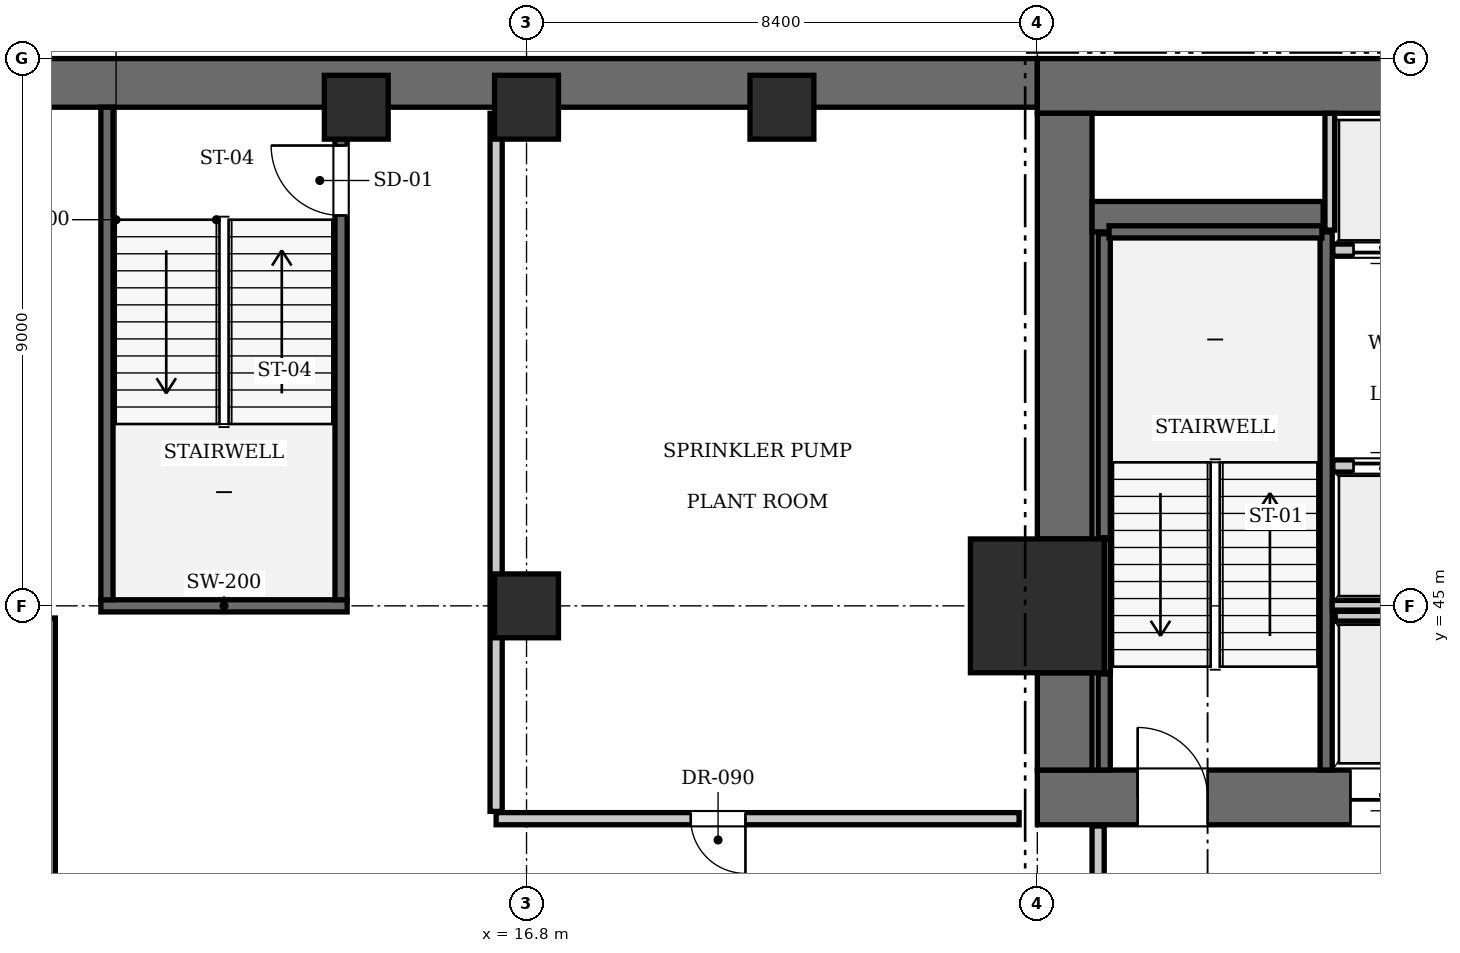
"""IFC4 building model, lengths in metres.
Left out: names, types, materials, properties, quantities, classifications, styles, units other than length and angle.
Written with IfcOpenShell. Run it as: python <this file> out.ifc"""

import sys

from ifc_helpers import new_model, si_unit, direction, frame, frame_2d, origin, origin_2d, place, context, subcontext, project, spatial, rectangle, extrude, element, fill, save


model = new_model("IFC4")
c1 = context("Model", 3, precision=1e-05, world=origin(), true_north=direction((0.0, 1.0)))
c2 = subcontext(c1, "Body", "Model", "MODEL_VIEW")
j1 = project(units=[si_unit("LENGTHUNIT", "METRE"), si_unit("PLANEANGLEUNIT", "RADIAN")], contexts=[c1])
p1 = place(None, origin())
s1 = spatial("IfcSite", under=j1, at=p1, CompositionType="ELEMENT")
p2 = place(p1, origin())
s2 = spatial("IfcBuilding", under=s1, at=p2, CompositionType="ELEMENT")
p3 = place(p2, frame((0.0, 0.0, -9.8)))
s3 = spatial("IfcBuildingStorey", under=s2, at=p3, CompositionType="ELEMENT", Elevation=-9.8)
p4 = place(p3, frame((0.0, 53.6, 0.0), z_axis=(0.0, 0.0, 1.0), x_axis=(1.0, 0.0, 0.0)))
e1 = element("IfcWall", 1, at=p4, inside=s3, PredefinedType="USERDEFINED", context=c2, shape_type="SweptSolid", body=[
    extrude(rectangle(XDim=25.2, YDim=0.8, at=frame_2d((12.6, 0.0))), origin(), (0.0, 0.0, 1.0), 4.55),
])
p5 = place(p3, frame((25.2, 45.0, -0.4), z_axis=(0.0, 0.0, 1.0), x_axis=(1.0, 0.0, 0.0)))
e2 = element("IfcColumn", 2, at=p5, inside=s3, PredefinedType="COLUMN", context=c2, shape_type="SweptSolid", body=[
    extrude(rectangle(XDim=2.2, YDim=2.2, at=origin_2d()), origin(), (0.0, 0.0, 1.0), 4.95),
])
p6 = place(p3, frame((25.2, 53.55, 0.0), z_axis=(0.0, 0.0, 1.0), x_axis=(1.0, 0.0, 0.0)))
e3 = element("IfcWall", 3, at=p6, inside=s3, PredefinedType="SHEAR", context=c2, shape_type="SweptSolid", body=[
    extrude(rectangle(XDim=25.2, YDim=0.9, at=frame_2d((12.6, 0.0))), origin(), (0.0, 0.0, 1.0), 4.55),
])
p7 = place(p3, frame((25.2, 41.85, 0.0), z_axis=(0.0, 0.0, 1.0), x_axis=(1.0, 0.0, 0.0)))
e4 = element("IfcWall", 4, at=p7, inside=s3, PredefinedType="SHEAR", context=c2, shape_type="SweptSolid", body=[
    extrude(rectangle(XDim=6.8, YDim=0.9, at=frame_2d((3.4, 0.0))), origin(), (0.0, 0.0, 1.0), 4.55),
])
p8 = place(p7, frame((1.65, 0.0, 0.0)))
e5 = element("IfcOpeningElement", 5, at=p8, cuts=e4, PredefinedType="OPENING", context=c2, shape_type="SweptSolid", body=[
    extrude(rectangle(XDim=1.15, YDim=2.15, at=frame_2d((0.575, 1.075))), frame((0.0, 0.46, 0.0), z_axis=(0.0, -1.0, 0.0), x_axis=(1.0, 0.0, 0.0)), (0.0, 0.0, 1.0), 0.92),
])
p9 = place(p7, frame((5.15, 0.0, 0.0)))
e6 = element("IfcOpeningElement", 6, at=p9, cuts=e4, PredefinedType="OPENING", context=c2, shape_type="SweptSolid", body=[
    extrude(rectangle(XDim=1.1, YDim=2.2, at=frame_2d((0.55, 1.1))), frame((0.0, 0.46, 0.0), z_axis=(0.0, -1.0, 0.0), x_axis=(1.0, 0.0, 0.0)), (0.0, 0.0, 1.0), 0.92),
])
p10 = place(p3, frame((25.65, 42.3, 0.0), z_axis=(0.0, 0.0, 1.0), x_axis=(0.0, 1.0, 0.0)))
e7 = element("IfcWall", 7, at=p10, inside=s3, PredefinedType="SHEAR", context=c2, shape_type="SweptSolid", body=[
    extrude(rectangle(XDim=1.6, YDim=0.9, at=frame_2d((0.8, 0.0))), origin(), (0.0, 0.0, 1.0), 4.55),
])
p11 = place(p3, frame((25.65, 46.1, 0.0), z_axis=(0.0, 0.0, 1.0), x_axis=(0.0, 1.0, 0.0)))
e8 = element("IfcWall", 8, at=p11, inside=s3, PredefinedType="SHEAR", context=c2, shape_type="SweptSolid", body=[
    extrude(rectangle(XDim=7.0, YDim=0.9, at=frame_2d((3.5, 0.0))), origin(), (0.0, 0.0, 1.0), 4.55),
])
p12 = place(p3, frame((26.1, 51.4, 0.0), z_axis=(0.0, 0.0, 1.0), x_axis=(1.0, 0.0, 0.0)))
e9 = element("IfcWall", 9, at=p12, inside=s3, PredefinedType="SHEAR", context=c2, shape_type="SweptSolid", body=[
    extrude(rectangle(XDim=3.8, YDim=0.5, at=frame_2d((1.9, 0.0))), origin(), (0.0, 0.0, 1.0), 4.55),
])
for number, where, z_axis, x_axis in (
    (10, (16.8, 45.0, -0.4), (0.0, 0.0, 1.0), (1.0, 0.0, 0.0)),
    (11, (16.8, 53.2, -0.4), (0.0, 0.0, 1.0), (1.0, 0.0, 0.0)),
    (12, (14.0, 53.2, -0.4), (0.0, 0.0, 1.0), (1.0, 0.0, 0.0)),
    (13, (21.0, 53.2, -0.4), (0.0, 0.0, 1.0), (1.0, 0.0, 0.0)),
):
    element("IfcColumn", number, at=place(p3, frame(where, z_axis=z_axis, x_axis=x_axis)), inside=s3, PredefinedType="COLUMN", context=c2, shape_type="SweptSolid", body=[
        extrude(rectangle(XDim=1.05, YDim=1.05, at=origin_2d()), origin(), (0.0, 0.0, 1.0), 4.95),
    ])
p13 = place(p3, frame((29.95, 42.3, 0.0), z_axis=(0.0, 0.0, 1.0), x_axis=(0.0, 1.0, 0.0)))
e14 = element("IfcWall", 14, at=p13, inside=s3, PredefinedType="SOLIDWALL", context=c2, shape_type="SweptSolid", body=[
    extrude(rectangle(XDim=8.85, YDim=0.2, at=frame_2d((4.425, 0.0))), origin(), (0.0, 0.0, 1.0), 4.2),
])
p14 = place(p3, frame((26.3, 42.3, 0.0), z_axis=(0.0, 0.0, 1.0), x_axis=(0.0, 1.0, 0.0)))
e15 = element("IfcWall", 15, at=p14, inside=s3, PredefinedType="SOLIDWALL", context=c2, shape_type="SweptSolid", body=[
    extrude(rectangle(XDim=1.58, YDim=0.2, at=frame_2d((0.79, 0.0))), origin(), (0.0, 0.0, 1.0), 4.2),
])
p15 = place(p3, frame((26.3, 46.12, 0.0), z_axis=(0.0, 0.0, 1.0), x_axis=(0.0, 1.0, 0.0)))
e16 = element("IfcWall", 16, at=p15, inside=s3, PredefinedType="SOLIDWALL", context=c2, shape_type="SweptSolid", body=[
    extrude(rectangle(XDim=5.0, YDim=0.2, at=frame_2d((2.5, 0.0))), origin(), (0.0, 0.0, 1.0), 4.2),
])
p16 = place(p3, frame((26.38, 51.15, 0.0), z_axis=(0.0, 0.0, 1.0), x_axis=(1.0, 0.0, 0.0)))
e17 = element("IfcWall", 17, at=p16, inside=s3, PredefinedType="SOLIDWALL", context=c2, shape_type="SweptSolid", body=[
    extrude(rectangle(XDim=3.5, YDim=0.2, at=frame_2d((1.75, 0.0))), origin(), (0.0, 0.0, 1.0), 4.2),
])
p17 = place(p3, frame((26.352, 43.9, 0.0), z_axis=(0.0, 0.0, 1.0), x_axis=(0.0, 1.0, 0.0)))
e18 = element("IfcWall", 18, at=p17, inside=s3, PredefinedType="SOLIDWALL", context=c2, shape_type="SweptSolid", body=[
    extrude(rectangle(XDim=2.2, YDim=0.1, at=frame_2d((1.1, 0.0))), origin(), (0.0, 0.0, 1.0), 4.2),
])
p18 = place(p3, frame((9.8, 45.0, 0.0), z_axis=(0.0, 0.0, 1.0), x_axis=(1.0, 0.0, 0.0)))
e19 = element("IfcWall", 19, at=p18, inside=s3, PredefinedType="SOLIDWALL", context=c2, shape_type="SweptSolid", body=[
    extrude(rectangle(XDim=4.05, YDim=0.2, at=frame_2d((2.025, 0.0))), origin(), (0.0, 0.0, 1.0), 3.565),
])
p19 = place(p3, frame((9.9, 45.1, 0.0), z_axis=(0.0, 0.0, 1.0), x_axis=(0.0, 1.0, 0.0)))
e20 = element("IfcWall", 20, at=p19, inside=s3, PredefinedType="SOLIDWALL", context=c2, shape_type="SweptSolid", body=[
    extrude(rectangle(XDim=8.1, YDim=0.2, at=frame_2d((4.05, 0.0))), origin(), (0.0, 0.0, 1.0), 4.2),
])
p20 = place(p3, frame((13.75, 45.1, 0.0), z_axis=(0.0, 0.0, 1.0), x_axis=(0.0, 1.0, 0.0)))
e21 = element("IfcWall", 21, at=p20, inside=s3, PredefinedType="SOLIDWALL", context=c2, shape_type="SweptSolid", body=[
    extrude(rectangle(XDim=8.1, YDim=0.2, at=frame_2d((4.05, 0.0))), origin(), (0.0, 0.0, 1.0), 4.2),
])
p21 = place(p20, frame((6.32, 0.0, 0.0)))
e22 = element("IfcOpeningElement", 22, at=p21, cuts=e21, PredefinedType="OPENING", context=c2, shape_type="SweptSolid", body=[
    extrude(rectangle(XDim=1.15, YDim=2.15, at=frame_2d((0.575, 1.075))), frame((0.0, 0.11, 0.0), z_axis=(0.0, -1.0, 0.0), x_axis=(1.0, 0.0, 0.0)), (0.0, 0.0, 1.0), 0.22),
])
p22 = place(p3, frame((30.06, 47.3, 0.0), z_axis=(0.0, 0.0, 1.0), x_axis=(1.0, 0.0, 0.0)))
e23 = element("IfcWall", 23, at=p22, inside=s3, PredefinedType="SOLIDWALL", context=c2, shape_type="SweptSolid", body=[
    extrude(rectangle(XDim=1.68, YDim=0.2, at=frame_2d((0.84, 0.0))), origin(), (0.0, 0.0, 1.0), 4.2),
])
p23 = place(p22, frame((0.34, 0.0, 0.0)))
e24 = element("IfcOpeningElement", 24, at=p23, cuts=e23, PredefinedType="OPENING", context=c2, shape_type="SweptSolid", body=[
    extrude(rectangle(XDim=1.0, YDim=2.15, at=frame_2d((0.5, 1.075))), frame((0.0, 0.11, 0.0), z_axis=(0.0, -1.0, 0.0), x_axis=(1.0, 0.0, 0.0)), (0.0, 0.0, 1.0), 0.22),
])
p24 = place(p3, frame((30.06, 50.85, 0.0), z_axis=(0.0, 0.0, 1.0), x_axis=(1.0, 0.0, 0.0)))
e25 = element("IfcWall", 25, at=p24, inside=s3, PredefinedType="SOLIDWALL", context=c2, shape_type="SweptSolid", body=[
    extrude(rectangle(XDim=1.68, YDim=0.2, at=frame_2d((0.84, 0.0))), origin(), (0.0, 0.0, 1.0), 4.2),
])
p25 = place(p24, frame((0.34, 0.0, 0.0)))
e26 = element("IfcOpeningElement", 26, at=p25, cuts=e25, PredefinedType="OPENING", context=c2, shape_type="SweptSolid", body=[
    extrude(rectangle(XDim=1.0, YDim=2.15, at=frame_2d((0.5, 1.075))), frame((0.0, 0.11, 0.0), z_axis=(0.0, -1.0, 0.0), x_axis=(1.0, 0.0, 0.0)), (0.0, 0.0, 1.0), 0.22),
])
p26 = place(p3, frame((30.1, 44.83, 0.0), z_axis=(0.0, 0.0, 1.0), x_axis=(1.0, 0.0, 0.0)))
e27 = element("IfcWall", 27, at=p26, inside=s3, PredefinedType="SOLIDWALL", context=c2, shape_type="SweptSolid", body=[
    extrude(rectangle(XDim=1.6, YDim=0.16, at=frame_2d((0.8, 0.0))), origin(), (0.0, 0.0, 1.0), 4.2),
])
p27 = place(p3, frame((30.05, 45.01, 0.0), z_axis=(0.0, 0.0, 1.0), x_axis=(1.0, 0.0, 0.0)))
e28 = element("IfcWall", 28, at=p27, inside=s3, PredefinedType="SOLIDWALL", context=c2, shape_type="SweptSolid", body=[
    extrude(rectangle(XDim=3.45, YDim=0.16, at=frame_2d((1.725, 0.0))), origin(), (0.0, 0.0, 1.0), 4.2),
])
p28 = place(p3, frame((30.01, 51.18, 0.0), z_axis=(0.0, 0.0, 1.0), x_axis=(0.0, 1.0, 0.0)))
e29 = element("IfcWall", 29, at=p28, inside=s3, PredefinedType="SOLIDWALL", context=c2, shape_type="SweptSolid", body=[
    extrude(rectangle(XDim=1.92, YDim=0.16, at=frame_2d((0.96, 0.0))), origin(), (0.0, 0.0, 1.0), 4.2),
])
p29 = place(p3, frame((26.2, 38.31, 0.0), z_axis=(0.0, 0.0, 1.0), x_axis=(0.0, 1.0, 0.0)))
e30 = element("IfcWall", 30, at=p29, inside=s3, PredefinedType="PARTITIONING", context=c2, shape_type="SweptSolid", body=[
    extrude(rectangle(XDim=3.07, YDim=0.2, at=frame_2d((1.535, 0.0))), origin(), (0.0, 0.0, 1.0), 4.2),
])
p30 = place(p3, frame((8.95, 0.9, 0.0), z_axis=(0.0, 0.0, 1.0), x_axis=(0.0, 1.0, 0.0)))
e31 = element("IfcWall", 31, at=p30, inside=s3, PredefinedType="PARTITIONING", context=c2, shape_type="SweptSolid", body=[
    extrude(rectangle(XDim=43.9, YDim=0.2, at=frame_2d((21.95, 0.0))), origin(), (0.0, 0.0, 1.0), 4.2),
])
p31 = place(p30, frame((4.0, 0.0, 0.0)))
e32 = element("IfcOpeningElement", 32, at=p31, cuts=e31, PredefinedType="OPENING", context=c2, shape_type="SweptSolid", body=[
    extrude(rectangle(XDim=2.2, YDim=2.4, at=frame_2d((1.1, 1.2))), frame((0.0, 0.11, 0.0), z_axis=(0.0, -1.0, 0.0), x_axis=(1.0, 0.0, 0.0)), (0.0, 0.0, 1.0), 0.22),
])
p32 = place(p30, frame((28.0, 0.0, 0.0)))
e33 = element("IfcOpeningElement", 33, at=p32, cuts=e31, PredefinedType="OPENING", context=c2, shape_type="SweptSolid", body=[
    extrude(rectangle(XDim=2.2, YDim=2.4, at=frame_2d((1.1, 1.2))), frame((0.0, 0.11, 0.0), z_axis=(0.0, -1.0, 0.0), x_axis=(1.0, 0.0, 0.0)), (0.0, 0.0, 1.0), 0.22),
])
p33 = place(p3, frame((16.3, 41.5, 0.0), z_axis=(0.0, 0.0, 1.0), x_axis=(1.0, 0.0, 0.0)))
e34 = element("IfcWall", 34, at=p33, inside=s3, PredefinedType="PARTITIONING", context=c2, shape_type="SweptSolid", body=[
    extrude(rectangle(XDim=8.6, YDim=0.2, at=frame_2d((4.3, 0.0))), origin(), (0.0, 0.0, 1.0), 4.2),
])
p34 = place(p33, frame((3.2, 0.0, 0.0)))
e35 = element("IfcOpeningElement", 35, at=p34, cuts=e34, PredefinedType="OPENING", context=c2, shape_type="SweptSolid", body=[
    extrude(rectangle(XDim=0.9, YDim=2.1, at=frame_2d((0.45, 1.05))), frame((0.0, 0.11, 0.0), z_axis=(0.0, -1.0, 0.0), x_axis=(1.0, 0.0, 0.0)), (0.0, 0.0, 1.0), 0.22),
])
p35 = place(p3, frame((16.3, 41.62, 0.0), z_axis=(0.0, 0.0, 1.0), x_axis=(0.0, 1.0, 0.0)))
e36 = element("IfcWall", 36, at=p35, inside=s3, PredefinedType="PARTITIONING", context=c2, shape_type="SweptSolid", body=[
    extrude(rectangle(XDim=11.48, YDim=0.2, at=frame_2d((5.74, 0.0))), origin(), (0.0, 0.0, 1.0), 4.2),
])
p36 = place(p8, origin())
e37 = element("IfcDoor", 37, at=p36, inside=s3, OperationType="SINGLE_SWING_LEFT", PredefinedType="DOOR", context=c2, shape_type="SweptSolid", body=[
    extrude(rectangle(XDim=1.15, YDim=2.15, at=frame_2d((0.575, 1.075))), frame((0.0, 0.025, 0.0), z_axis=(0.0, -1.0, 0.0), x_axis=(1.0, 0.0, 0.0)), (0.0, 0.0, 1.0), 0.05),
])
fill(e5, e37)
p37 = place(p21, origin())
e38 = element("IfcDoor", 38, at=p37, inside=s3, OperationType="SINGLE_SWING_RIGHT", PredefinedType="DOOR", context=c2, shape_type="SweptSolid", body=[
    extrude(rectangle(XDim=1.15, YDim=2.15, at=frame_2d((0.575, 1.075))), frame((0.0, 0.025, 0.0), z_axis=(0.0, -1.0, 0.0), x_axis=(1.0, 0.0, 0.0)), (0.0, 0.0, 1.0), 0.05),
])
fill(e22, e38)
p38 = place(p23, origin())
e39 = element("IfcDoor", 39, at=p38, inside=s3, OperationType="SLIDING_TO_LEFT", PredefinedType="DOOR", context=c2, shape_type="SweptSolid", body=[
    extrude(rectangle(XDim=1.0, YDim=2.15, at=frame_2d((0.5, 1.075))), frame((0.0, 0.025, 0.0), z_axis=(0.0, -1.0, 0.0), x_axis=(1.0, 0.0, 0.0)), (0.0, 0.0, 1.0), 0.05),
])
fill(e24, e39)
p39 = place(p25, frame((1.0, 0.0, 0.0), z_axis=(0.0, 0.0, 1.0), x_axis=(-1.0, 0.0, 0.0)))
e40 = element("IfcDoor", 40, at=p39, inside=s3, OperationType="SLIDING_TO_LEFT", PredefinedType="DOOR", context=c2, shape_type="SweptSolid", body=[
    extrude(rectangle(XDim=1.0, YDim=2.15, at=frame_2d((0.5, 1.075))), frame((0.0, 0.025, 0.0), z_axis=(0.0, -1.0, 0.0), x_axis=(1.0, 0.0, 0.0)), (0.0, 0.0, 1.0), 0.05),
])
fill(e26, e40)
p40 = place(p9, frame((1.1, 0.0, 0.0), z_axis=(0.0, 0.0, 1.0), x_axis=(-1.0, 0.0, 0.0)))
e41 = element("IfcDoor", 41, at=p40, inside=s3, OperationType="SLIDING_TO_LEFT", PredefinedType="DOOR", context=c2, shape_type="SweptSolid", body=[
    extrude(rectangle(XDim=1.1, YDim=2.2, at=frame_2d((0.55, 1.1))), frame((0.0, 0.025, 0.0), z_axis=(0.0, -1.0, 0.0), x_axis=(1.0, 0.0, 0.0)), (0.0, 0.0, 1.0), 0.05),
])
fill(e6, e41)
p41 = place(p34, frame((0.9, 0.0, 0.0), z_axis=(0.0, 0.0, 1.0), x_axis=(-1.0, 0.0, 0.0)))
e42 = element("IfcDoor", 42, at=p41, inside=s3, OperationType="SINGLE_SWING_LEFT", PredefinedType="DOOR", context=c2, shape_type="SweptSolid", body=[
    extrude(rectangle(XDim=0.9, YDim=2.1, at=frame_2d((0.45, 1.05))), frame((0.0, 0.025, 0.0), z_axis=(0.0, -1.0, 0.0), x_axis=(1.0, 0.0, 0.0)), (0.0, 0.0, 1.0), 0.05),
])
fill(e35, e42)
save(model, sys.argv[1])
